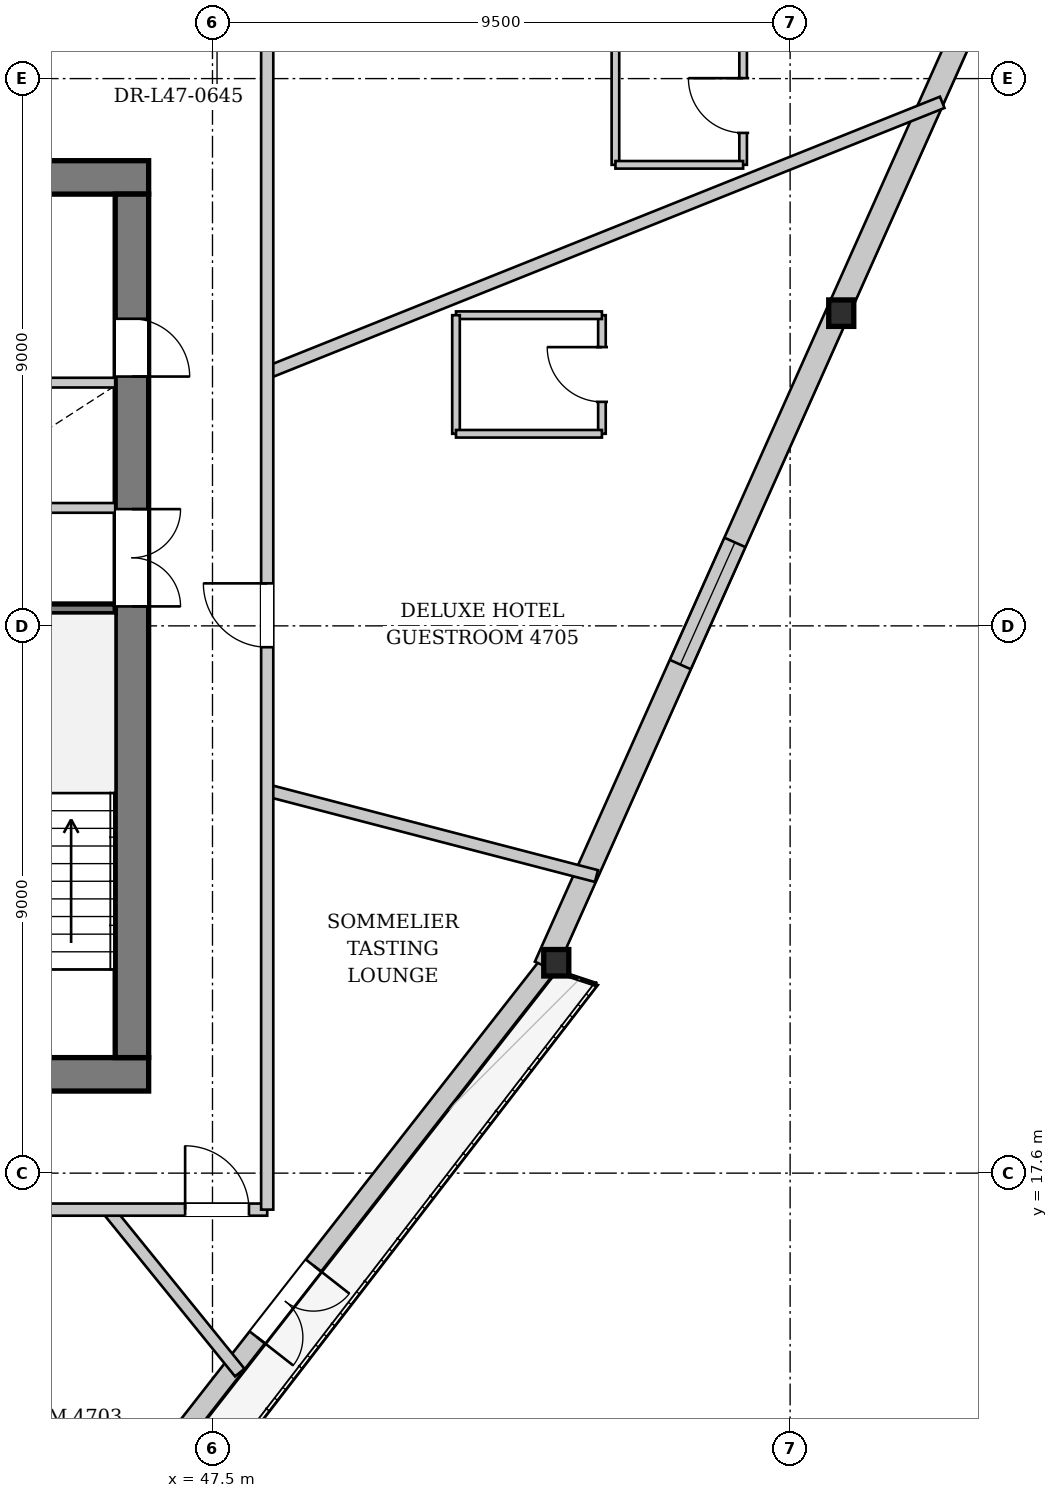
"""IFC4 building model, lengths in metres.
Left out: names, types, materials, properties, quantities, classifications, styles, units other than length and angle.
Written with IfcOpenShell. Run it as: python <this file> out.ifc"""

import sys

from ifc_helpers import new_model, si_unit, direction, frame, frame_2d, origin, origin_2d, place, context, subcontext, project, spatial, rectangle, i_section, extrude, source, transform, mapped, element, fill, save


model = new_model("IFC4")
c1 = context("Model", 3, precision=1e-05, world=origin(), true_north=direction((0.0, 1.0)))
c2 = subcontext(c1, "Body", "Model", "MODEL_VIEW")
j1 = project(units=[si_unit("LENGTHUNIT", "METRE"), si_unit("PLANEANGLEUNIT", "RADIAN")], contexts=[c1])
p1 = place(None, origin())
s1 = spatial("IfcSite", under=j1, at=p1, CompositionType="ELEMENT")
p2 = place(p1, origin())
s2 = spatial("IfcBuilding", under=s1, at=p2, CompositionType="ELEMENT")
p3 = place(p2, frame((0.0, 0.0, 178.55)))
s3 = spatial("IfcBuildingStorey", under=s2, at=p3, CompositionType="ELEMENT", Elevation=178.55)
m1 = source(origin(), c2, "Body", "SweptSolid", [
    extrude(i_section(OverallWidth=0.412, OverallDepth=0.435, WebThickness=0.031, FlangeThickness=0.05, at=origin_2d()), origin(), (0.0, 0.0, 1.0), 3.396),
])
p4 = place(p3, frame((53.149, 20.923, 0.0), z_axis=(0.002803613193, 0.080873457504, 0.996720434036), x_axis=(-0.99939965217, 0.034645854609, 0.0)))
e1 = element("IfcColumn", 1, at=p4, inside=s3, PredefinedType="COLUMN", context=c2, shape_type="MappedRepresentation", body=[
    mapped(m1, transform((0.0, 0.0, 0.0), x_axis=(1.0, 0.0, 0.0), y_axis=(0.0, 1.0, 0.0), z_axis=(0.0, 0.0, 1.0), scale=1.0)),
])
m2 = source(origin(), c2, "Body", "SweptSolid", [
    extrude(i_section(OverallWidth=0.412, OverallDepth=0.435, WebThickness=0.031, FlangeThickness=0.05, at=origin_2d()), origin(), (0.0, 0.0, 1.0), 3.404),
])
p5 = place(p3, frame((57.912, 31.58, 0.0), z_axis=(-0.042034391169, 0.095402287123, 0.994550910497), x_axis=(-0.915112004841, -0.403199725441, 0.0)))
e2 = element("IfcColumn", 2, at=p5, inside=s3, PredefinedType="COLUMN", context=c2, shape_type="MappedRepresentation", body=[
    mapped(m2, transform((0.0, 0.0, 0.0), x_axis=(1.0, 0.0, 0.0), y_axis=(0.0, 1.0, 0.0), z_axis=(0.0, 0.0, 1.0), scale=1.0)),
])
p6 = place(p3, frame((53.023, 21.021, 0.0), z_axis=(0.0, 0.0, 1.0), x_axis=(-0.61594757216, -0.787787146601, 0.0)))
e3 = element("IfcWall", 3, at=p6, inside=s3, PredefinedType="SOLIDWALL", context=c2, shape_type="SweptSolid", body=[
    extrude(rectangle(XDim=23.347, YDim=0.32, at=frame_2d((11.674, 0.0))), origin(), (0.0, 0.0, 1.0), 2.722),
])
p7 = place(p6, frame((6.271, 0.0, 0.0)))
e4 = element("IfcOpeningElement", 4, at=p7, cuts=e3, PredefinedType="OPENING", context=c2, shape_type="SweptSolid", body=[
    extrude(rectangle(XDim=1.5, YDim=2.3, at=frame_2d((0.75, 1.15))), frame((0.0, 0.17, 0.0), z_axis=(0.0, -1.0, 0.0), x_axis=(1.0, 0.0, 0.0)), (0.0, 0.0, 1.0), 0.34),
])
p8 = place(p6, frame((15.977, 0.0, 0.252)))
e5 = element("IfcOpeningElement", 5, at=p8, cuts=e3, PredefinedType="OPENING", context=c2, shape_type="SweptSolid", body=[
    extrude(rectangle(XDim=2.6, YDim=2.35, at=frame_2d((1.3, 1.175))), frame((0.0, 0.17, 0.0), z_axis=(0.0, -1.0, 0.0), x_axis=(1.0, 0.0, 0.0)), (0.0, 0.0, 1.0), 0.34),
])
p9 = place(p3, frame((62.502, 42.315, 0.0), z_axis=(0.0, 0.0, 1.0), x_axis=(-0.408010166112, -0.912977384358, 0.0)))
e6 = element("IfcWall", 6, at=p9, inside=s3, PredefinedType="SOLIDWALL", context=c2, shape_type="SweptSolid", body=[
    extrude(rectangle(XDim=23.347, YDim=0.38, at=frame_2d((11.674, 0.0))), origin(), (0.0, 0.0, 1.0), 2.722),
])
p10 = place(p9, frame((4.337, 0.0, 0.352)))
e7 = element("IfcOpeningElement", 7, at=p10, cuts=e6, PredefinedType="OPENING", context=c2, shape_type="SweptSolid", body=[
    extrude(rectangle(XDim=2.2, YDim=2.25, at=frame_2d((1.1, 1.125))), frame((0.0, 0.2, 0.0), z_axis=(0.0, -1.0, 0.0), x_axis=(1.0, 0.0, 0.0)), (0.0, 0.0, 1.0), 0.4),
])
p11 = place(p9, frame((15.71, 0.0, 0.352)))
e8 = element("IfcOpeningElement", 8, at=p11, cuts=e6, PredefinedType="OPENING", context=c2, shape_type="SweptSolid", body=[
    extrude(rectangle(XDim=2.2, YDim=2.25, at=frame_2d((1.1, 1.125))), frame((0.0, 0.2, 0.0), z_axis=(0.0, -1.0, 0.0), x_axis=(1.0, 0.0, 0.0)), (0.0, 0.0, 1.0), 0.4),
])
p12 = place(p3, frame((46.45, 19.225, 0.0), z_axis=(0.0, 0.0, 1.0), x_axis=(-1.0, 0.0, 0.0)))
e9 = element("IfcWall", 9, at=p12, inside=s3, PredefinedType="SHEAR", context=c2, shape_type="SweptSolid", body=[
    extrude(rectangle(XDim=16.9, YDim=0.55, at=frame_2d((8.45, 0.0))), origin(), (0.0, 0.0, 1.0), 3.33),
])
p13 = place(p12, frame((4.65, 0.0, 0.0)))
e10 = element("IfcOpeningElement", 10, at=p13, cuts=e9, PredefinedType="OPENING", context=c2, shape_type="SweptSolid", body=[
    extrude(rectangle(XDim=1.12, YDim=2.25, at=frame_2d((0.56, 1.125))), frame((0.0, 0.285, 0.0), z_axis=(0.0, -1.0, 0.0), x_axis=(1.0, 0.0, 0.0)), (0.0, 0.0, 1.0), 0.57),
])
p14 = place(p12, frame((11.15, 0.0, 0.0)))
e11 = element("IfcOpeningElement", 11, at=p14, cuts=e9, PredefinedType="OPENING", context=c2, shape_type="SweptSolid", body=[
    extrude(rectangle(XDim=1.12, YDim=2.25, at=frame_2d((0.56, 1.125))), frame((0.0, 0.285, 0.0), z_axis=(0.0, -1.0, 0.0), x_axis=(1.0, 0.0, 0.0)), (0.0, 0.0, 1.0), 0.57),
])
p15 = place(p3, frame((29.55, 33.975, 0.0), z_axis=(0.0, 0.0, 1.0), x_axis=(1.0, 0.0, 0.0)))
e12 = element("IfcWall", 12, at=p15, inside=s3, PredefinedType="SHEAR", context=c2, shape_type="SweptSolid", body=[
    extrude(rectangle(XDim=16.9, YDim=0.55, at=frame_2d((8.45, 0.0))), origin(), (0.0, 0.0, 1.0), 3.33),
])
p16 = place(p15, frame((1.55, 0.0, 0.0)))
e13 = element("IfcOpeningElement", 13, at=p16, cuts=e12, PredefinedType="OPENING", context=c2, shape_type="SweptSolid", body=[
    extrude(rectangle(XDim=0.95, YDim=2.1, at=frame_2d((0.475, 1.05))), frame((0.0, 0.285, 0.0), z_axis=(0.0, -1.0, 0.0), x_axis=(1.0, 0.0, 0.0)), (0.0, 0.0, 1.0), 0.57),
])
p17 = place(p15, frame((3.93, 0.0, 0.0)))
e14 = element("IfcOpeningElement", 14, at=p17, cuts=e12, PredefinedType="OPENING", context=c2, shape_type="SweptSolid", body=[
    extrude(rectangle(XDim=1.32, YDim=2.2, at=frame_2d((0.66, 1.1))), frame((0.0, 0.285, 0.0), z_axis=(0.0, -1.0, 0.0), x_axis=(1.0, 0.0, 0.0)), (0.0, 0.0, 1.0), 0.57),
])
p18 = place(p3, frame((46.175, 33.7, 0.0), z_axis=(0.0, 0.0, 1.0), x_axis=(0.0, -1.0, 0.0)))
e15 = element("IfcWall", 15, at=p18, inside=s3, PredefinedType="SHEAR", context=c2, shape_type="SweptSolid", body=[
    extrude(rectangle(XDim=14.2, YDim=0.55, at=frame_2d((7.1, 0.0))), origin(), (0.0, 0.0, 1.0), 3.33),
])
p19 = place(p18, frame((5.18, 0.0, 0.0)))
e16 = element("IfcOpeningElement", 16, at=p19, cuts=e15, PredefinedType="OPENING", context=c2, shape_type="SweptSolid", body=[
    extrude(rectangle(XDim=1.6, YDim=2.2, at=frame_2d((0.8, 1.1))), frame((0.0, 0.285, 0.0), z_axis=(0.0, -1.0, 0.0), x_axis=(1.0, 0.0, 0.0)), (0.0, 0.0, 1.0), 0.57),
])
p20 = place(p18, frame((2.05, 0.0, 0.0)))
e17 = element("IfcOpeningElement", 17, at=p20, cuts=e15, PredefinedType="OPENING", context=c2, shape_type="SweptSolid", body=[
    extrude(rectangle(XDim=0.95, YDim=2.1, at=frame_2d((0.475, 1.05))), frame((0.0, 0.285, 0.0), z_axis=(0.0, -1.0, 0.0), x_axis=(1.0, 0.0, 0.0)), (0.0, 0.0, 1.0), 0.57),
])
p21 = place(p3, frame((42.88, 26.88, 0.0), z_axis=(0.0, 0.0, 1.0), x_axis=(1.0, 0.0, 0.0)))
e18 = element("IfcWall", 18, at=p21, inside=s3, PredefinedType="PARTITIONING", context=c2, shape_type="SweptSolid", body=[
    extrude(rectangle(XDim=3.02, YDim=0.16, at=frame_2d((1.51, 0.0))), origin(), (0.0, 0.0, 1.0), 3.33),
])
p22 = place(p3, frame((33.28, 28.54, 0.0), z_axis=(0.0, 0.0, 1.0), x_axis=(1.0, 0.0, 0.0)))
e19 = element("IfcWall", 19, at=p22, inside=s3, PredefinedType="PARTITIONING", context=c2, shape_type="SweptSolid", body=[
    extrude(rectangle(XDim=12.62, YDim=0.16, at=frame_2d((6.31, 0.0))), origin(), (0.0, 0.0, 1.0), 3.33),
])
p23 = place(p22, frame((0.26, 0.0, 0.0)))
e20 = element("IfcOpeningElement", 20, at=p23, cuts=e19, PredefinedType="OPENING", context=c2, shape_type="SweptSolid", body=[
    extrude(rectangle(XDim=1.1, YDim=2.2, at=frame_2d((0.55, 1.1))), frame((0.0, 0.09, 0.0), z_axis=(0.0, -1.0, 0.0), x_axis=(1.0, 0.0, 0.0)), (0.0, 0.0, 1.0), 0.18),
])
p24 = place(p22, frame((2.01, 0.0, 0.0)))
e21 = element("IfcOpeningElement", 21, at=p24, cuts=e19, PredefinedType="OPENING", context=c2, shape_type="SweptSolid", body=[
    extrude(rectangle(XDim=1.1, YDim=2.2, at=frame_2d((0.55, 1.1))), frame((0.0, 0.09, 0.0), z_axis=(0.0, -1.0, 0.0), x_axis=(1.0, 0.0, 0.0)), (0.0, 0.0, 1.0), 0.18),
])
p25 = place(p22, frame((3.76, 0.0, 0.0)))
e22 = element("IfcOpeningElement", 22, at=p25, cuts=e19, PredefinedType="OPENING", context=c2, shape_type="SweptSolid", body=[
    extrude(rectangle(XDim=1.1, YDim=2.2, at=frame_2d((0.55, 1.1))), frame((0.0, 0.09, 0.0), z_axis=(0.0, -1.0, 0.0), x_axis=(1.0, 0.0, 0.0)), (0.0, 0.0, 1.0), 0.18),
])
p26 = place(p3, frame((40.72, 30.6, 0.0), z_axis=(0.0, 0.0, 1.0), x_axis=(1.0, 0.0, 0.0)))
e23 = element("IfcWall", 23, at=p26, inside=s3, PredefinedType="PARTITIONING", context=c2, shape_type="SweptSolid", body=[
    extrude(rectangle(XDim=5.18, YDim=0.16, at=frame_2d((2.59, 0.0))), origin(), (0.0, 0.0, 1.0), 3.33),
])
p27 = place(p3, frame((45.778, 17.0, 0.0), z_axis=(0.0, 0.0, 1.0), x_axis=(0.629534141466, -0.776972821101, 0.0)))
e24 = element("IfcWall", 24, at=p27, inside=s3, PredefinedType="PARTITIONING", context=c2, shape_type="SweptSolid", body=[
    extrude(rectangle(XDim=3.449, YDim=0.2, at=frame_2d((1.725, 0.0))), origin(), (0.0, 0.0, 1.0), 3.33),
])
p28 = place(p3, frame((48.4, 23.895, 0.0), z_axis=(0.0, 0.0, 1.0), x_axis=(0.96779125921, -0.251754004132, 0.0)))
e25 = element("IfcWall", 25, at=p28, inside=s3, PredefinedType="PARTITIONING", context=c2, shape_type="SweptSolid", body=[
    extrude(rectangle(XDim=5.595, YDim=0.2, at=frame_2d((2.798, 0.0))), origin(), (0.0, 0.0, 1.0), 3.33),
])
p29 = place(p3, frame((48.4, 30.764, 0.0), z_axis=(0.0, 0.0, 1.0), x_axis=(0.928341463562, 0.371728566338, 0.0)))
e26 = element("IfcWall", 26, at=p29, inside=s3, PredefinedType="PARTITIONING", context=c2, shape_type="SweptSolid", body=[
    extrude(rectangle(XDim=11.958, YDim=0.2, at=frame_2d((5.979, 0.0))), origin(), (0.0, 0.0, 1.0), 3.33),
])
p30 = place(p3, frame((53.905, 29.759, 0.0), z_axis=(0.0, 0.0, 1.0), x_axis=(0.0, 1.0, 0.0)))
e27 = element("IfcWall", 27, at=p30, inside=s3, PredefinedType="PARTITIONING", context=c2, shape_type="SweptSolid", body=[
    extrude(rectangle(XDim=1.95, YDim=0.125, at=frame_2d((0.975, 0.0))), origin(), (0.0, 0.0, 1.0), 3.33),
])
p31 = place(p30, frame((0.525, 0.0, 0.0)))
e28 = element("IfcOpeningElement", 28, at=p31, cuts=e27, PredefinedType="OPENING", context=c2, shape_type="SweptSolid", body=[
    extrude(rectangle(XDim=0.9, YDim=2.1, at=frame_2d((0.45, 1.05))), frame((0.0, 0.073, 0.0), z_axis=(0.0, -1.0, 0.0), x_axis=(1.0, 0.0, 0.0)), (0.0, 0.0, 1.0), 0.145),
])
p32 = place(p3, frame((53.905, 31.709, 0.0), z_axis=(0.0, 0.0, 1.0), x_axis=(-1.0, 0.0, 0.0)))
e29 = element("IfcWall", 29, at=p32, inside=s3, PredefinedType="PARTITIONING", context=c2, shape_type="SweptSolid", body=[
    extrude(rectangle(XDim=2.4, YDim=0.125, at=frame_2d((1.2, 0.0))), origin(), (0.0, 0.0, 1.0), 3.33),
])
p33 = place(p3, frame((51.505, 31.709, 0.0), z_axis=(0.0, 0.0, 1.0), x_axis=(0.0, -1.0, 0.0)))
e30 = element("IfcWall", 30, at=p33, inside=s3, PredefinedType="PARTITIONING", context=c2, shape_type="SweptSolid", body=[
    extrude(rectangle(XDim=1.95, YDim=0.125, at=frame_2d((0.975, 0.0))), origin(), (0.0, 0.0, 1.0), 3.33),
])
p34 = place(p3, frame((51.505, 29.759, 0.0), z_axis=(0.0, 0.0, 1.0), x_axis=(1.0, 0.0, 0.0)))
e31 = element("IfcWall", 31, at=p34, inside=s3, PredefinedType="PARTITIONING", context=c2, shape_type="SweptSolid", body=[
    extrude(rectangle(XDim=2.4, YDim=0.125, at=frame_2d((1.2, 0.0))), origin(), (0.0, 0.0, 1.0), 3.33),
])
p35 = place(p3, frame((56.227, 34.182, 0.0), z_axis=(0.0, 0.0, 1.0), x_axis=(0.0, 1.0, 0.0)))
e32 = element("IfcWall", 32, at=p35, inside=s3, PredefinedType="PARTITIONING", context=c2, shape_type="SweptSolid", body=[
    extrude(rectangle(XDim=1.95, YDim=0.125, at=frame_2d((0.975, 0.0))), origin(), (0.0, 0.0, 1.0), 3.33),
])
p36 = place(p35, frame((0.525, 0.0, 0.0)))
e33 = element("IfcOpeningElement", 33, at=p36, cuts=e32, PredefinedType="OPENING", context=c2, shape_type="SweptSolid", body=[
    extrude(rectangle(XDim=0.9, YDim=2.1, at=frame_2d((0.45, 1.05))), frame((0.0, 0.073, 0.0), z_axis=(0.0, -1.0, 0.0), x_axis=(1.0, 0.0, 0.0)), (0.0, 0.0, 1.0), 0.145),
])
p37 = place(p3, frame((54.127, 36.132, 0.0), z_axis=(0.0, 0.0, 1.0), x_axis=(0.0, -1.0, 0.0)))
e34 = element("IfcWall", 34, at=p37, inside=s3, PredefinedType="PARTITIONING", context=c2, shape_type="SweptSolid", body=[
    extrude(rectangle(XDim=1.95, YDim=0.125, at=frame_2d((0.975, 0.0))), origin(), (0.0, 0.0, 1.0), 3.33),
])
p38 = place(p3, frame((54.127, 34.182, 0.0), z_axis=(0.0, 0.0, 1.0), x_axis=(1.0, 0.0, 0.0)))
e35 = element("IfcWall", 35, at=p38, inside=s3, PredefinedType="PARTITIONING", context=c2, shape_type="SweptSolid", body=[
    extrude(rectangle(XDim=2.1, YDim=0.125, at=frame_2d((1.05, 0.0))), origin(), (0.0, 0.0, 1.0), 3.33),
])
p39 = place(p3, frame((27.6, 17.0, 0.0), z_axis=(0.0, 0.0, 1.0), x_axis=(1.0, 0.0, 0.0)))
e36 = element("IfcWall", 36, at=p39, inside=s3, PredefinedType="PARTITIONING", context=c2, shape_type="SweptSolid", body=[
    extrude(rectangle(XDim=20.8, YDim=0.2, at=frame_2d((10.4, 0.0))), origin(), (0.0, 0.0, 1.0), 3.33),
])
p40 = place(p39, frame((5.92, 0.0, 0.0)))
e37 = element("IfcOpeningElement", 37, at=p40, cuts=e36, PredefinedType="OPENING", context=c2, shape_type="SweptSolid", body=[
    extrude(rectangle(XDim=1.05, YDim=2.2, at=frame_2d((0.525, 1.1))), frame((0.0, 0.11, 0.0), z_axis=(0.0, -1.0, 0.0), x_axis=(1.0, 0.0, 0.0)), (0.0, 0.0, 1.0), 0.22),
])
p41 = place(p39, frame((14.844, 0.0, 0.0)))
e38 = element("IfcOpeningElement", 38, at=p41, cuts=e36, PredefinedType="OPENING", context=c2, shape_type="SweptSolid", body=[
    extrude(rectangle(XDim=1.05, YDim=2.2, at=frame_2d((0.525, 1.1))), frame((0.0, 0.11, 0.0), z_axis=(0.0, -1.0, 0.0), x_axis=(1.0, 0.0, 0.0)), (0.0, 0.0, 1.0), 0.22),
])
p42 = place(p39, frame((19.45, 0.0, 0.0)))
e39 = element("IfcOpeningElement", 39, at=p42, cuts=e36, PredefinedType="OPENING", context=c2, shape_type="SweptSolid", body=[
    extrude(rectangle(XDim=1.05, YDim=2.2, at=frame_2d((0.525, 1.1))), frame((0.0, 0.11, 0.0), z_axis=(0.0, -1.0, 0.0), x_axis=(1.0, 0.0, 0.0)), (0.0, 0.0, 1.0), 0.22),
])
p43 = place(p3, frame((48.4, 17.0, 0.0), z_axis=(0.0, 0.0, 1.0), x_axis=(0.0, 1.0, 0.0)))
e40 = element("IfcWall", 40, at=p43, inside=s3, PredefinedType="PARTITIONING", context=c2, shape_type="SweptSolid", body=[
    extrude(rectangle(XDim=19.2, YDim=0.2, at=frame_2d((9.6, 0.0))), origin(), (0.0, 0.0, 1.0), 3.33),
])
p44 = place(p43, frame((9.249, 0.0, 0.0)))
e41 = element("IfcOpeningElement", 41, at=p44, cuts=e40, PredefinedType="OPENING", context=c2, shape_type="SweptSolid", body=[
    extrude(rectangle(XDim=1.05, YDim=2.2, at=frame_2d((0.525, 1.1))), frame((0.0, 0.11, 0.0), z_axis=(0.0, -1.0, 0.0), x_axis=(1.0, 0.0, 0.0)), (0.0, 0.0, 1.0), 0.22),
])
m3 = source(origin(), c2, "Body", "SweptSolid", [
    extrude(rectangle(XDim=1.5, YDim=2.3, at=frame_2d((0.75, 1.15))), frame((0.0, 0.025, 0.0), z_axis=(0.0, -1.0, 0.0), x_axis=(1.0, 0.0, 0.0)), (0.0, 0.0, 1.0), 0.05),
])
p45 = place(p7, origin())
e42 = element("IfcDoor", 42, at=p45, inside=s3, OperationType="DOUBLE_DOOR_SINGLE_SWING", PredefinedType="DOOR", context=c2, shape_type="MappedRepresentation", body=[
    mapped(m3, transform((0.0, 0.0, 0.0), x_axis=(1.0, 0.0, 0.0), y_axis=(0.0, 1.0, 0.0), z_axis=(0.0, 0.0, 1.0), scale=1.0)),
])
fill(e4, e42)
m4 = source(origin(), c2, "Body", "SweptSolid", [
    extrude(rectangle(XDim=2.2, YDim=2.25, at=frame_2d((1.1, 1.125))), frame((0.0, 0.03, 0.0), z_axis=(0.0, -1.0, 0.0), x_axis=(1.0, 0.0, 0.0)), (0.0, 0.0, 1.0), 0.06),
])
p46 = place(p11, origin())
e43 = element("IfcWindow", 43, at=p46, inside=s3, PartitioningType="SINGLE_PANEL", PredefinedType="WINDOW", context=c2, shape_type="MappedRepresentation", body=[
    mapped(m4, transform((0.0, 0.0, 0.0), x_axis=(1.0, 0.0, 0.0), y_axis=(0.0, 1.0, 0.0), z_axis=(0.0, 0.0, 1.0), scale=1.0)),
])
fill(e8, e43)
m5 = source(origin(), c2, "Body", "SweptSolid", [
    extrude(rectangle(XDim=1.6, YDim=2.2, at=frame_2d((0.8, 1.1))), frame((0.0, 0.025, 0.0), z_axis=(0.0, -1.0, 0.0), x_axis=(1.0, 0.0, 0.0)), (0.0, 0.0, 1.0), 0.05),
])
p47 = place(p19, origin())
e44 = element("IfcDoor", 44, at=p47, inside=s3, OperationType="DOUBLE_DOOR_SINGLE_SWING", PredefinedType="DOOR", context=c2, shape_type="MappedRepresentation", body=[
    mapped(m5, transform((0.0, 0.0, 0.0), x_axis=(1.0, 0.0, 0.0), y_axis=(0.0, 1.0, 0.0), z_axis=(0.0, 0.0, 1.0), scale=1.0)),
])
fill(e16, e44)
m6 = source(origin(), c2, "Body", "SweptSolid", [
    extrude(rectangle(XDim=0.95, YDim=2.1, at=frame_2d((0.475, 1.05))), frame((0.0, 0.025, 0.0), z_axis=(0.0, -1.0, 0.0), x_axis=(1.0, 0.0, 0.0)), (0.0, 0.0, 1.0), 0.05),
])
p48 = place(p20, origin())
e45 = element("IfcDoor", 45, at=p48, inside=s3, OperationType="SINGLE_SWING_RIGHT", PredefinedType="DOOR", context=c2, shape_type="MappedRepresentation", body=[
    mapped(m6, transform((0.0, 0.0, 0.0), x_axis=(1.0, 0.0, 0.0), y_axis=(0.0, 1.0, 0.0), z_axis=(0.0, 0.0, 1.0), scale=1.0)),
])
fill(e17, e45)
m7 = source(origin(), c2, "Body", "SweptSolid", [
    extrude(rectangle(XDim=0.9, YDim=2.1, at=frame_2d((0.45, 1.05))), frame((0.0, 0.025, 0.0), z_axis=(0.0, -1.0, 0.0), x_axis=(1.0, 0.0, 0.0)), (0.0, 0.0, 1.0), 0.05),
])
p49 = place(p31, origin())
e46 = element("IfcDoor", 46, at=p49, inside=s3, OperationType="SINGLE_SWING_RIGHT", PredefinedType="DOOR", context=c2, shape_type="MappedRepresentation", body=[
    mapped(m7, transform((0.0, 0.0, 0.0), x_axis=(1.0, 0.0, 0.0), y_axis=(0.0, 1.0, 0.0), z_axis=(0.0, 0.0, 1.0), scale=1.0)),
])
fill(e28, e46)
p50 = place(p36, origin())
e47 = element("IfcDoor", 47, at=p50, inside=s3, OperationType="SINGLE_SWING_RIGHT", PredefinedType="DOOR", context=c2, shape_type="MappedRepresentation", body=[
    mapped(m7, transform((0.0, 0.0, 0.0), x_axis=(1.0, 0.0, 0.0), y_axis=(0.0, 1.0, 0.0), z_axis=(0.0, 0.0, 1.0), scale=1.0)),
])
fill(e33, e47)
m8 = source(origin(), c2, "Body", "SweptSolid", [
    extrude(rectangle(XDim=1.05, YDim=2.2, at=frame_2d((0.525, 1.1))), frame((0.0, 0.025, 0.0), z_axis=(0.0, -1.0, 0.0), x_axis=(1.0, 0.0, 0.0)), (0.0, 0.0, 1.0), 0.05),
])
p51 = place(p42, origin())
e48 = element("IfcDoor", 48, at=p51, inside=s3, OperationType="SINGLE_SWING_LEFT", PredefinedType="DOOR", context=c2, shape_type="MappedRepresentation", body=[
    mapped(m8, transform((0.0, 0.0, 0.0), x_axis=(1.0, 0.0, 0.0), y_axis=(0.0, 1.0, 0.0), z_axis=(0.0, 0.0, 1.0), scale=1.0)),
])
fill(e39, e48)
p52 = place(p44, origin())
e49 = element("IfcDoor", 49, at=p52, inside=s3, OperationType="SINGLE_SWING_RIGHT", PredefinedType="DOOR", context=c2, shape_type="MappedRepresentation", body=[
    mapped(m8, transform((0.0, 0.0, 0.0), x_axis=(1.0, 0.0, 0.0), y_axis=(0.0, 1.0, 0.0), z_axis=(0.0, 0.0, 1.0), scale=1.0)),
])
fill(e41, e49)
save(model, sys.argv[1])
